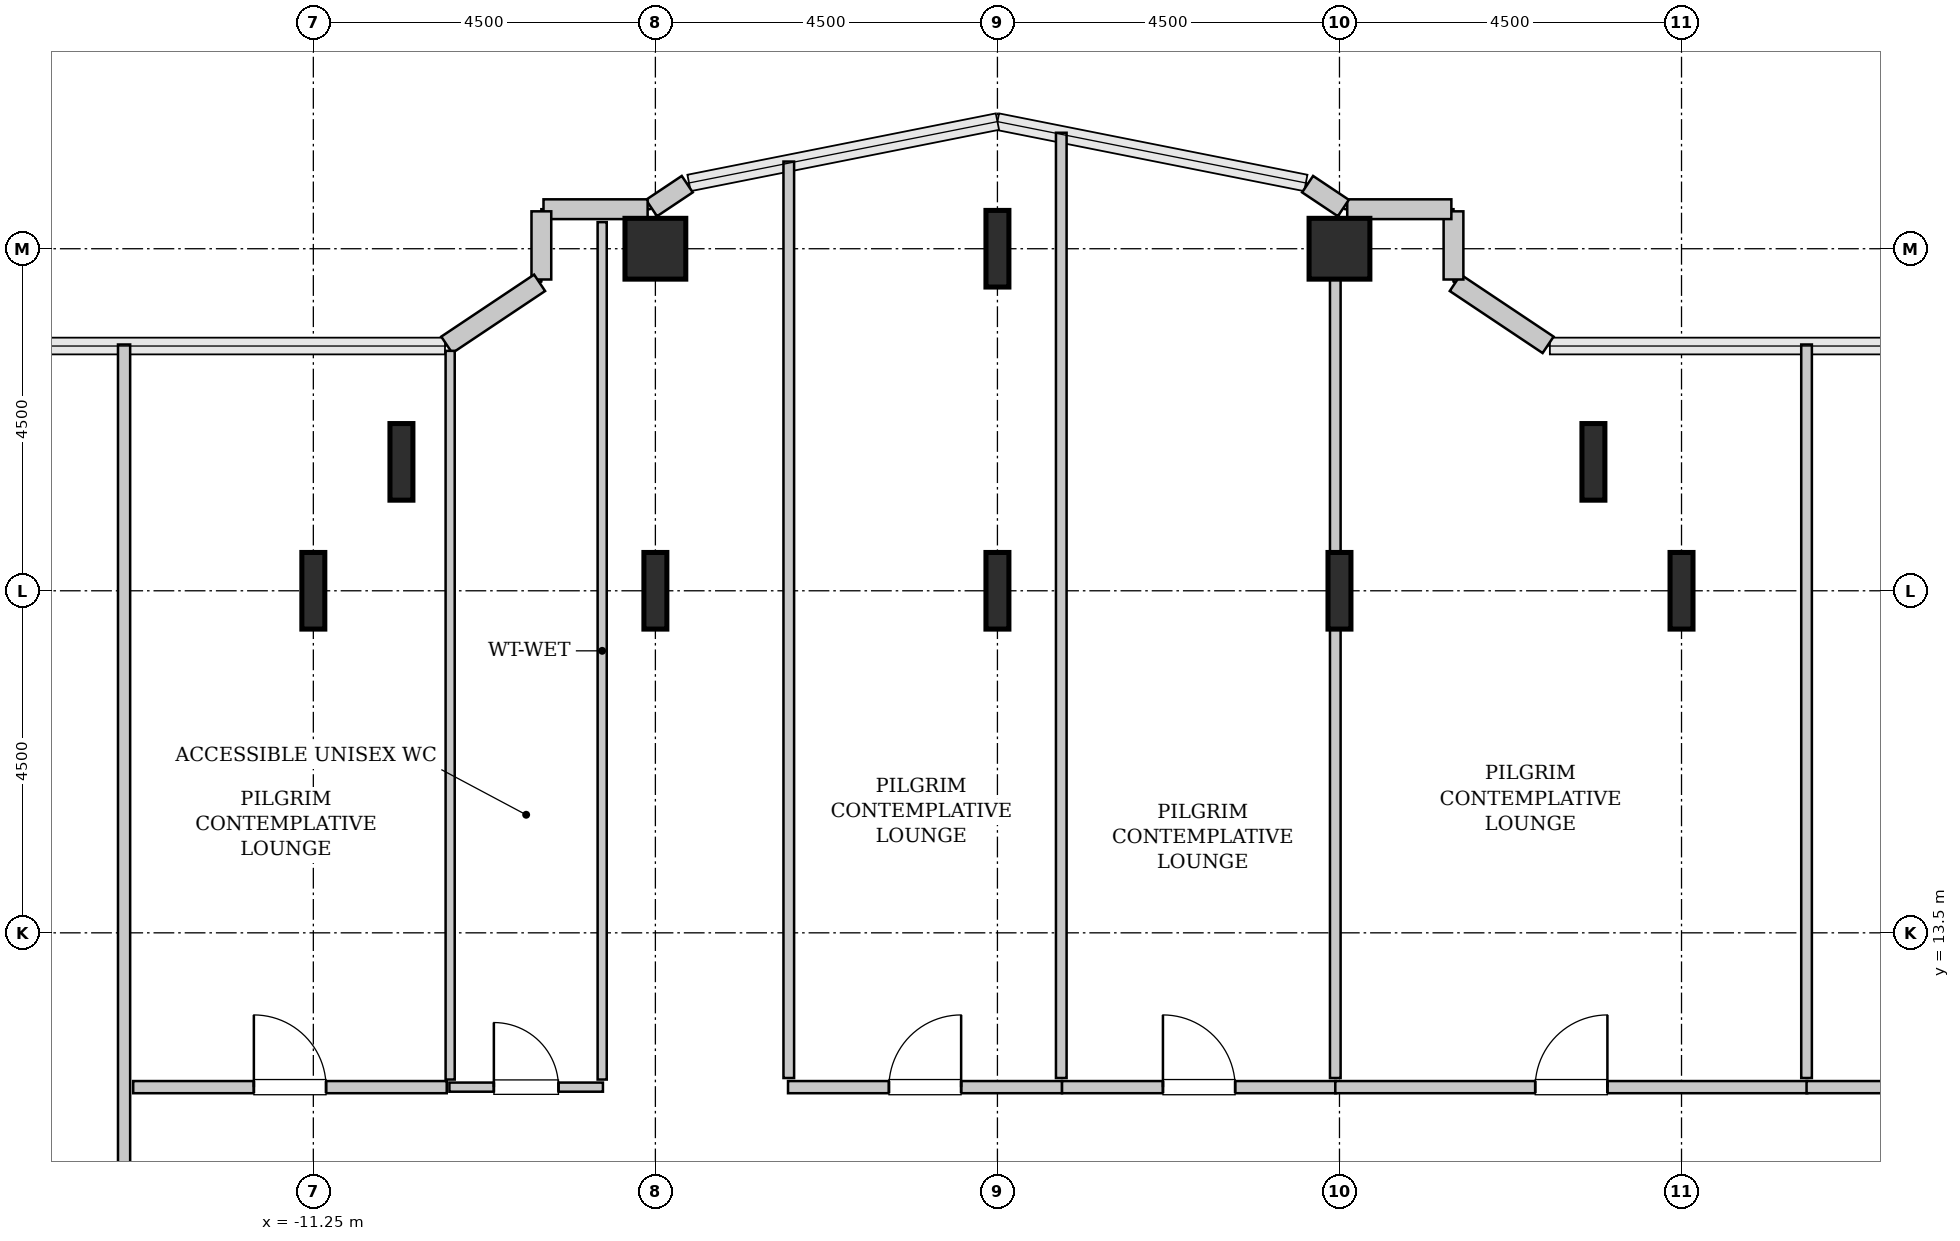
"""IFC4 building model, lengths in metres.
Left out: names, types, materials, properties, quantities, classifications, styles, units other than length and angle.
Written with IfcOpenShell. Run it as: python <this file> out.ifc"""

import sys

from ifc_helpers import new_model, si_unit, direction, frame, frame_2d, origin, origin_2d, place, context, subcontext, project, spatial, rectangle, hollow_rectangle, i_section, extrude, source, transform, mapped, element, fill, save


model = new_model("IFC4")
c1 = context("Model", 3, precision=1e-05, world=origin(), true_north=direction((0.0, 1.0)))
c2 = subcontext(c1, "Body", "Model", "MODEL_VIEW")
j1 = project(units=[si_unit("LENGTHUNIT", "METRE"), si_unit("PLANEANGLEUNIT", "RADIAN")], contexts=[c1])
p1 = place(None, origin())
s1 = spatial("IfcSite", under=j1, at=p1, CompositionType="ELEMENT")
p2 = place(p1, origin())
s2 = spatial("IfcBuilding", under=s1, at=p2, CompositionType="ELEMENT")
p3 = place(p2, frame((0.0, 0.0, 132.6)))
s3 = spatial("IfcBuildingStorey", under=s2, at=p3, CompositionType="ELEMENT", Elevation=132.6)
m1 = source(origin(), c2, "Body", "SweptSolid", [
    extrude(i_section(OverallWidth=0.302, OverallDepth=1.008, WebThickness=0.021, FlangeThickness=0.04, FilletRadius=0.03, at=origin_2d()), origin(), (0.0, 0.0, 1.0), 3.8),
])
for number, where, z_axis, x_axis in (
    (1, (-11.25, 18.0, 0.0), (0.0, 0.0, 1.0), (1.0, 0.0, 0.0)),
    (2, (-10.091, 19.696, 0.0), (0.0, 0.0, 1.0), (1.0, 0.0, 0.0)),
    (3, (-6.75, 18.0, 0.0), (0.0, 0.0, 1.0), (1.0, 0.0, 0.0)),
):
    element("IfcColumn", number, at=place(p3, frame(where, z_axis=z_axis, x_axis=x_axis)), inside=s3, PredefinedType="COLUMN", context=c2, shape_type="MappedRepresentation", body=[
        mapped(m1, transform((0.0, 0.0, 0.0), x_axis=(1.0, 0.0, 0.0), y_axis=(0.0, 1.0, 0.0), z_axis=(0.0, 0.0, 1.0), scale=1.0)),
    ])
m2 = source(origin(), c2, "Body", "SweptSolid", [
    extrude(hollow_rectangle(XDim=0.8, YDim=0.8, WallThickness=0.04, InnerFilletRadius=0.04, OuterFilletRadius=0.08, at=origin_2d()), origin(), (0.0, 0.0, 1.0), 3.8),
])
p4 = place(p3, frame((-6.75, 22.5, 0.0), z_axis=(0.0, 0.0, 1.0), x_axis=(1.0, 0.0, 0.0)))
e4 = element("IfcColumn", 4, at=p4, inside=s3, PredefinedType="COLUMN", context=c2, shape_type="MappedRepresentation", body=[
    mapped(m2, transform((0.0, 0.0, 0.0), x_axis=(1.0, 0.0, 0.0), y_axis=(0.0, 1.0, 0.0), z_axis=(0.0, 0.0, 1.0), scale=1.0)),
])
for number, where, z_axis, x_axis in (
    (5, (-2.25, 18.0, 0.0), (0.0, 0.0, 1.0), (1.0, 0.0, 0.0)),
    (6, (-2.25, 22.5, 0.0), (0.0, 0.0, 1.0), (1.0, 0.0, 0.0)),
    (7, (2.25, 18.0, 0.0), (0.0, 0.0, 1.0), (1.0, 0.0, 0.0)),
):
    element("IfcColumn", number, at=place(p3, frame(where, z_axis=z_axis, x_axis=x_axis)), inside=s3, PredefinedType="COLUMN", context=c2, shape_type="MappedRepresentation", body=[
        mapped(m1, transform((0.0, 0.0, 0.0), x_axis=(1.0, 0.0, 0.0), y_axis=(0.0, 1.0, 0.0), z_axis=(0.0, 0.0, 1.0), scale=1.0)),
    ])
p5 = place(p3, frame((2.25, 22.5, 0.0), z_axis=(0.0, 0.0, 1.0), x_axis=(1.0, 0.0, 0.0)))
e8 = element("IfcColumn", 8, at=p5, inside=s3, PredefinedType="COLUMN", context=c2, shape_type="MappedRepresentation", body=[
    mapped(m2, transform((0.0, 0.0, 0.0), x_axis=(1.0, 0.0, 0.0), y_axis=(0.0, 1.0, 0.0), z_axis=(0.0, 0.0, 1.0), scale=1.0)),
])
for number, where, z_axis, x_axis in (
    (9, (5.591, 19.696, 0.0), (0.0, 0.0, 1.0), (1.0, 0.0, 0.0)),
    (10, (6.75, 18.0, 0.0), (0.0, 0.0, 1.0), (1.0, 0.0, 0.0)),
):
    element("IfcColumn", number, at=place(p3, frame(where, z_axis=z_axis, x_axis=x_axis)), inside=s3, PredefinedType="COLUMN", context=c2, shape_type="MappedRepresentation", body=[
        mapped(m1, transform((0.0, 0.0, 0.0), x_axis=(1.0, 0.0, 0.0), y_axis=(0.0, 1.0, 0.0), z_axis=(0.0, 0.0, 1.0), scale=1.0)),
    ])
m3 = source(origin(), c2, "Body", "SweptSolid", [
    extrude(rectangle(XDim=1.469, YDim=0.26, at=frame_2d((0.734, 0.0))), origin(), (0.0, 0.0, 1.0), 3.55),
])
p6 = place(p3, frame((4.995, 21.236, 0.0), z_axis=(0.0, 0.0, 1.0), x_axis=(-0.831461760506, 0.555581983884, 0.0)))
e11 = element("IfcWall", 11, at=p6, inside=s3, PredefinedType="SOLIDWALL", context=c2, shape_type="MappedRepresentation", body=[
    mapped(m3, transform((0.0, 0.0, 0.0), x_axis=(1.0, 0.0, 0.0), y_axis=(0.0, 1.0, 0.0), z_axis=(0.0, 0.0, 1.0), scale=1.0)),
])
m4 = source(origin(), c2, "Body", "SweptSolid", [
    extrude(rectangle(XDim=0.897, YDim=0.26, at=frame_2d((0.448, 0.0))), origin(), (0.0, 0.0, 1.0), 3.55),
])
p7 = place(p3, frame((3.75, 22.095, 0.0), z_axis=(0.0, 0.0, 1.0), x_axis=(0.0, 1.0, 0.0)))
e12 = element("IfcWall", 12, at=p7, inside=s3, PredefinedType="SOLIDWALL", context=c2, shape_type="MappedRepresentation", body=[
    mapped(m4, transform((0.0, 0.0, 0.0), x_axis=(1.0, 0.0, 0.0), y_axis=(0.0, 1.0, 0.0), z_axis=(0.0, 0.0, 1.0), scale=1.0)),
])
m5 = source(origin(), c2, "Body", "SweptSolid", [
    extrude(rectangle(XDim=1.37, YDim=0.26, at=frame_2d((0.685, 0.0))), origin(), (0.0, 0.0, 1.0), 3.55),
])
p8 = place(p3, frame((3.722, 23.02, 0.0), z_axis=(0.0, 0.0, 1.0), x_axis=(-1.0, 0.0, 0.0)))
e13 = element("IfcWall", 13, at=p8, inside=s3, PredefinedType="SOLIDWALL", context=c2, shape_type="MappedRepresentation", body=[
    mapped(m5, transform((0.0, 0.0, 0.0), x_axis=(1.0, 0.0, 0.0), y_axis=(0.0, 1.0, 0.0), z_axis=(0.0, 0.0, 1.0), scale=1.0)),
])
m6 = source(origin(), c2, "Body", "SweptSolid", [
    extrude(rectangle(XDim=0.565, YDim=0.26, at=frame_2d((0.283, 0.0))), origin(), (0.0, 0.0, 1.0), 3.55),
])
for number, where, z_axis, x_axis in (
    (14, (2.301, 23.036, 0.0), (0.0, 0.0, 1.0), (-0.832, 0.555, 0.0)),
    (15, (-6.331, 23.35, 0.0), (0.0, 0.0, 1.0), (-0.832, -0.555, 0.0)),
):
    element("IfcWall", number, at=place(p3, frame(where, z_axis=z_axis, x_axis=x_axis)), inside=s3, PredefinedType="SOLIDWALL", context=c2, shape_type="MappedRepresentation", body=[
        mapped(m6, transform((0.0, 0.0, 0.0), x_axis=(1.0, 0.0, 0.0), y_axis=(0.0, 1.0, 0.0), z_axis=(0.0, 0.0, 1.0), scale=1.0)),
    ])
p9 = place(p3, frame((-6.852, 23.02, 0.0), z_axis=(0.0, 0.0, 1.0), x_axis=(-1.0, 0.0, 0.0)))
e16 = element("IfcWall", 16, at=p9, inside=s3, PredefinedType="SOLIDWALL", context=c2, shape_type="MappedRepresentation", body=[
    mapped(m5, transform((0.0, 0.0, 0.0), x_axis=(1.0, 0.0, 0.0), y_axis=(0.0, 1.0, 0.0), z_axis=(0.0, 0.0, 1.0), scale=1.0)),
])
p10 = place(p3, frame((-8.25, 22.992, 0.0), z_axis=(0.0, 0.0, 1.0), x_axis=(0.0, -1.0, 0.0)))
e17 = element("IfcWall", 17, at=p10, inside=s3, PredefinedType="SOLIDWALL", context=c2, shape_type="MappedRepresentation", body=[
    mapped(m4, transform((0.0, 0.0, 0.0), x_axis=(1.0, 0.0, 0.0), y_axis=(0.0, 1.0, 0.0), z_axis=(0.0, 0.0, 1.0), scale=1.0)),
])
p11 = place(p3, frame((-8.273, 22.052, 0.0), z_axis=(0.0, 0.0, 1.0), x_axis=(-0.831461760506, -0.555581983884, 0.0)))
e18 = element("IfcWall", 18, at=p11, inside=s3, PredefinedType="SOLIDWALL", context=c2, shape_type="MappedRepresentation", body=[
    mapped(m3, transform((0.0, 0.0, 0.0), x_axis=(1.0, 0.0, 0.0), y_axis=(0.0, 1.0, 0.0), z_axis=(0.0, 0.0, 1.0), scale=1.0)),
])
m7 = source(origin(), c2, "Body", "SweptSolid", [
    extrude(rectangle(XDim=2.02, YDim=0.12, at=frame_2d((1.01, 0.0))), origin(), (0.0, 0.0, 1.0), 3.535),
])
p12 = place(p3, frame((-9.46, 11.47, 0.0), z_axis=(0.0, 0.0, 1.0), x_axis=(1.0, 0.0, 0.0)))
e19 = element("IfcWall", 19, at=p12, inside=s3, PredefinedType="PLUMBINGWALL", context=c2, shape_type="MappedRepresentation", body=[
    mapped(m7, transform((0.0, 0.0, 0.0), x_axis=(1.0, 0.0, 0.0), y_axis=(0.0, 1.0, 0.0), z_axis=(0.0, 0.0, 1.0), scale=1.0)),
])
p13 = place(p12, frame((0.585, 0.0, 0.0)))
e20 = element("IfcOpeningElement", 20, at=p13, cuts=e19, PredefinedType="OPENING", context=c2, shape_type="SweptSolid", body=[
    extrude(rectangle(XDim=0.85, YDim=2.1, at=frame_2d((0.425, 1.05))), frame((0.0, 0.07, 0.0), z_axis=(0.0, -1.0, 0.0), x_axis=(1.0, 0.0, 0.0)), (0.0, 0.0, 1.0), 0.14),
])
m8 = source(origin(), c2, "Body", "SweptSolid", [
    extrude(rectangle(XDim=11.28, YDim=0.12, at=frame_2d((5.64, 0.0))), origin(), (0.0, 0.0, 1.0), 3.535),
])
p14 = place(p3, frame((-7.45, 11.57, 0.0), z_axis=(0.0, 0.0, 1.0), x_axis=(0.0, 1.0, 0.0)))
e21 = element("IfcWall", 21, at=p14, inside=s3, PredefinedType="PLUMBINGWALL", context=c2, shape_type="MappedRepresentation", body=[
    mapped(m8, transform((0.0, 0.0, 0.0), x_axis=(1.0, 0.0, 0.0), y_axis=(0.0, 1.0, 0.0), z_axis=(0.0, 0.0, 1.0), scale=1.0)),
])
m9 = source(origin(), c2, "Body", "SweptSolid", [
    extrude(rectangle(XDim=9.587, YDim=0.12, at=frame_2d((4.793, 0.0))), origin(), (0.0, 0.0, 1.0), 3.535),
])
p15 = place(p3, frame((-9.45, 11.57, 0.0), z_axis=(0.0, 0.0, 1.0), x_axis=(0.0, 1.0, 0.0)))
e22 = element("IfcWall", 22, at=p15, inside=s3, PredefinedType="PLUMBINGWALL", context=c2, shape_type="MappedRepresentation", body=[
    mapped(m9, transform((0.0, 0.0, 0.0), x_axis=(1.0, 0.0, 0.0), y_axis=(0.0, 1.0, 0.0), z_axis=(0.0, 0.0, 1.0), scale=1.0)),
])
m10 = source(origin(), c2, "Body", "SweptSolid", [
    extrude(rectangle(XDim=15.645, YDim=0.16, at=frame_2d((7.823, 0.0))), origin(), (0.0, 0.0, 1.0), 3.535),
])
p16 = place(p3, frame((-13.74, 5.595, 0.0), z_axis=(0.0, 0.0, 1.0), x_axis=(0.0, 1.0, 0.0)))
e23 = element("IfcWall", 23, at=p16, inside=s3, PredefinedType="PARTITIONING", context=c2, shape_type="MappedRepresentation", body=[
    mapped(m10, transform((0.0, 0.0, 0.0), x_axis=(1.0, 0.0, 0.0), y_axis=(0.0, 1.0, 0.0), z_axis=(0.0, 0.0, 1.0), scale=1.0)),
])
p17 = place(p16, frame((2.482, 0.0, 0.0)))
e24 = element("IfcOpeningElement", 24, at=p17, cuts=e23, PredefinedType="OPENING", context=c2, shape_type="SweptSolid", body=[
    extrude(rectangle(XDim=0.95, YDim=2.1, at=frame_2d((0.475, 1.05))), frame((0.0, 0.09, 0.0), z_axis=(0.0, -1.0, 0.0), x_axis=(1.0, 0.0, 0.0)), (0.0, 0.0, 1.0), 0.18),
])
m11 = source(origin(), c2, "Body", "SweptSolid", [
    extrude(rectangle(XDim=4.125, YDim=0.16, at=frame_2d((2.062, 0.0))), origin(), (0.0, 0.0, 1.0), 3.535),
])
p18 = place(p3, frame((-13.62, 11.47, 0.0), z_axis=(0.0, 0.0, 1.0), x_axis=(1.0, 0.0, 0.0)))
e25 = element("IfcWall", 25, at=p18, inside=s3, PredefinedType="PARTITIONING", context=c2, shape_type="MappedRepresentation", body=[
    mapped(m11, transform((0.0, 0.0, 0.0), x_axis=(1.0, 0.0, 0.0), y_axis=(0.0, 1.0, 0.0), z_axis=(0.0, 0.0, 1.0), scale=1.0)),
])
p19 = place(p18, frame((1.587, 0.0, 0.0)))
e26 = element("IfcOpeningElement", 26, at=p19, cuts=e25, PredefinedType="OPENING", context=c2, shape_type="SweptSolid", body=[
    extrude(rectangle(XDim=0.95, YDim=2.1, at=frame_2d((0.475, 1.05))), frame((0.0, 0.09, 0.0), z_axis=(0.0, -1.0, 0.0), x_axis=(1.0, 0.0, 0.0)), (0.0, 0.0, 1.0), 0.18),
])
m12 = source(origin(), c2, "Body", "SweptSolid", [
    extrude(rectangle(XDim=3.605, YDim=0.16, at=frame_2d((1.802, 0.0))), origin(), (0.0, 0.0, 1.0), 3.535),
])
p20 = place(p3, frame((-5.005, 11.47, 0.0), z_axis=(0.0, 0.0, 1.0), x_axis=(1.0, 0.0, 0.0)))
e27 = element("IfcWall", 27, at=p20, inside=s3, PredefinedType="PARTITIONING", context=c2, shape_type="MappedRepresentation", body=[
    mapped(m12, transform((0.0, 0.0, 0.0), x_axis=(1.0, 0.0, 0.0), y_axis=(0.0, 1.0, 0.0), z_axis=(0.0, 0.0, 1.0), scale=1.0)),
])
p21 = place(p20, frame((1.327, 0.0, 0.0)))
e28 = element("IfcOpeningElement", 28, at=p21, cuts=e27, PredefinedType="OPENING", context=c2, shape_type="SweptSolid", body=[
    extrude(rectangle(XDim=0.95, YDim=2.1, at=frame_2d((0.475, 1.05))), frame((0.0, 0.09, 0.0), z_axis=(0.0, -1.0, 0.0), x_axis=(1.0, 0.0, 0.0)), (0.0, 0.0, 1.0), 0.18),
])
m13 = source(origin(), c2, "Body", "SweptSolid", [
    extrude(rectangle(XDim=12.436, YDim=0.14, at=frame_2d((6.218, 0.0))), origin(), (0.0, 0.0, 1.0), 3.535),
])
p22 = place(p3, frame((-1.41, 11.59, 0.0), z_axis=(0.0, 0.0, 1.0), x_axis=(0.0, 1.0, 0.0)))
e29 = element("IfcWall", 29, at=p22, inside=s3, PredefinedType="PARTITIONING", context=c2, shape_type="MappedRepresentation", body=[
    mapped(m13, transform((0.0, 0.0, 0.0), x_axis=(1.0, 0.0, 0.0), y_axis=(0.0, 1.0, 0.0), z_axis=(0.0, 0.0, 1.0), scale=1.0)),
])
m14 = source(origin(), c2, "Body", "SweptSolid", [
    extrude(rectangle(XDim=12.057, YDim=0.14, at=frame_2d((6.028, 0.0))), origin(), (0.0, 0.0, 1.0), 3.535),
])
p23 = place(p3, frame((-4.995, 11.59, 0.0), z_axis=(0.0, 0.0, 1.0), x_axis=(0.0, 1.0, 0.0)))
e30 = element("IfcWall", 30, at=p23, inside=s3, PredefinedType="PARTITIONING", context=c2, shape_type="MappedRepresentation", body=[
    mapped(m14, transform((0.0, 0.0, 0.0), x_axis=(1.0, 0.0, 0.0), y_axis=(0.0, 1.0, 0.0), z_axis=(0.0, 0.0, 1.0), scale=1.0)),
])
p24 = place(p3, frame((-1.4, 11.47, 0.0), z_axis=(0.0, 0.0, 1.0), x_axis=(1.0, 0.0, 0.0)))
e31 = element("IfcWall", 31, at=p24, inside=s3, PredefinedType="PARTITIONING", context=c2, shape_type="MappedRepresentation", body=[
    mapped(m12, transform((0.0, 0.0, 0.0), x_axis=(1.0, 0.0, 0.0), y_axis=(0.0, 1.0, 0.0), z_axis=(0.0, 0.0, 1.0), scale=1.0)),
])
p25 = place(p24, frame((1.327, 0.0, 0.0)))
e32 = element("IfcOpeningElement", 32, at=p25, cuts=e31, PredefinedType="OPENING", context=c2, shape_type="SweptSolid", body=[
    extrude(rectangle(XDim=0.95, YDim=2.1, at=frame_2d((0.475, 1.05))), frame((0.0, 0.09, 0.0), z_axis=(0.0, -1.0, 0.0), x_axis=(1.0, 0.0, 0.0)), (0.0, 0.0, 1.0), 0.18),
])
m15 = source(origin(), c2, "Body", "SweptSolid", [
    extrude(rectangle(XDim=11.314, YDim=0.14, at=frame_2d((5.657, 0.0))), origin(), (0.0, 0.0, 1.0), 2.875),
])
p26 = place(p3, frame((2.195, 11.59, 0.0), z_axis=(0.0, 0.0, 1.0), x_axis=(0.0, 1.0, 0.0)))
e33 = element("IfcWall", 33, at=p26, inside=s3, PredefinedType="PARTITIONING", context=c2, shape_type="MappedRepresentation", body=[
    mapped(m15, transform((0.0, 0.0, 0.0), x_axis=(1.0, 0.0, 0.0), y_axis=(0.0, 1.0, 0.0), z_axis=(0.0, 0.0, 1.0), scale=1.0)),
])
m16 = source(origin(), c2, "Body", "SweptSolid", [
    extrude(rectangle(XDim=6.21, YDim=0.16, at=frame_2d((3.105, 0.0))), origin(), (0.0, 0.0, 1.0), 3.535),
])
p27 = place(p3, frame((2.195, 11.47, 0.0), z_axis=(0.0, 0.0, 1.0), x_axis=(1.0, 0.0, 0.0)))
e34 = element("IfcWall", 34, at=p27, inside=s3, PredefinedType="PARTITIONING", context=c2, shape_type="MappedRepresentation", body=[
    mapped(m16, transform((0.0, 0.0, 0.0), x_axis=(1.0, 0.0, 0.0), y_axis=(0.0, 1.0, 0.0), z_axis=(0.0, 0.0, 1.0), scale=1.0)),
])
p28 = place(p27, frame((2.63, 0.0, 0.0)))
e35 = element("IfcOpeningElement", 35, at=p28, cuts=e34, PredefinedType="OPENING", context=c2, shape_type="SweptSolid", body=[
    extrude(rectangle(XDim=0.95, YDim=2.1, at=frame_2d((0.475, 1.05))), frame((0.0, 0.09, 0.0), z_axis=(0.0, -1.0, 0.0), x_axis=(1.0, 0.0, 0.0)), (0.0, 0.0, 1.0), 0.18),
])
m17 = source(origin(), c2, "Body", "SweptSolid", [
    extrude(rectangle(XDim=9.65, YDim=0.14, at=frame_2d((4.825, 0.0))), origin(), (0.0, 0.0, 1.0), 3.535),
])
p29 = place(p3, frame((8.395, 11.59, 0.0), z_axis=(0.0, 0.0, 1.0), x_axis=(0.0, 1.0, 0.0)))
e36 = element("IfcWall", 36, at=p29, inside=s3, PredefinedType="PARTITIONING", context=c2, shape_type="MappedRepresentation", body=[
    mapped(m17, transform((0.0, 0.0, 0.0), x_axis=(1.0, 0.0, 0.0), y_axis=(0.0, 1.0, 0.0), z_axis=(0.0, 0.0, 1.0), scale=1.0)),
])
m18 = source(origin(), c2, "Body", "SweptSolid", [
    extrude(rectangle(XDim=5.225, YDim=0.16, at=frame_2d((2.613, 0.0))), origin(), (0.0, 0.0, 1.0), 3.535),
])
p30 = place(p3, frame((8.395, 11.47, 0.0), z_axis=(0.0, 0.0, 1.0), x_axis=(1.0, 0.0, 0.0)))
e37 = element("IfcWall", 37, at=p30, inside=s3, PredefinedType="PARTITIONING", context=c2, shape_type="MappedRepresentation", body=[
    mapped(m18, transform((0.0, 0.0, 0.0), x_axis=(1.0, 0.0, 0.0), y_axis=(0.0, 1.0, 0.0), z_axis=(0.0, 0.0, 1.0), scale=1.0)),
])
p31 = place(p30, frame((2.137, 0.0, 0.0)))
e38 = element("IfcOpeningElement", 38, at=p31, cuts=e37, PredefinedType="OPENING", context=c2, shape_type="SweptSolid", body=[
    extrude(rectangle(XDim=0.95, YDim=2.1, at=frame_2d((0.475, 1.05))), frame((0.0, 0.09, 0.0), z_axis=(0.0, -1.0, 0.0), x_axis=(1.0, 0.0, 0.0)), (0.0, 0.0, 1.0), 0.18),
])
m19 = source(origin(), c2, "Body", "SweptSolid", [
    extrude(rectangle(XDim=0.85, YDim=2.1, at=frame_2d((0.425, 1.05))), frame((0.0, 0.025, 0.0), z_axis=(0.0, -1.0, 0.0), x_axis=(1.0, 0.0, 0.0)), (0.0, 0.0, 1.0), 0.05),
])
p32 = place(p13, origin())
e39 = element("IfcDoor", 39, at=p32, inside=s3, OperationType="SINGLE_SWING_LEFT", PredefinedType="DOOR", context=c2, shape_type="MappedRepresentation", body=[
    mapped(m19, transform((0.0, 0.0, 0.0), x_axis=(1.0, 0.0, 0.0), y_axis=(0.0, 1.0, 0.0), z_axis=(0.0, 0.0, 1.0), scale=1.0)),
])
fill(e20, e39)
m20 = source(origin(), c2, "Body", "SweptSolid", [
    extrude(rectangle(XDim=0.95, YDim=2.1, at=frame_2d((0.475, 1.05))), frame((0.0, 0.025, 0.0), z_axis=(0.0, -1.0, 0.0), x_axis=(1.0, 0.0, 0.0)), (0.0, 0.0, 1.0), 0.05),
])
p33 = place(p19, origin())
e40 = element("IfcDoor", 40, at=p33, inside=s3, OperationType="SINGLE_SWING_LEFT", PredefinedType="DOOR", context=c2, shape_type="MappedRepresentation", body=[
    mapped(m20, transform((0.0, 0.0, 0.0), x_axis=(1.0, 0.0, 0.0), y_axis=(0.0, 1.0, 0.0), z_axis=(0.0, 0.0, 1.0), scale=1.0)),
])
fill(e26, e40)
p34 = place(p21, origin())
e41 = element("IfcDoor", 41, at=p34, inside=s3, OperationType="SINGLE_SWING_RIGHT", PredefinedType="DOOR", context=c2, shape_type="MappedRepresentation", body=[
    mapped(m20, transform((0.0, 0.0, 0.0), x_axis=(1.0, 0.0, 0.0), y_axis=(0.0, 1.0, 0.0), z_axis=(0.0, 0.0, 1.0), scale=1.0)),
])
fill(e28, e41)
p35 = place(p25, origin())
e42 = element("IfcDoor", 42, at=p35, inside=s3, OperationType="SINGLE_SWING_LEFT", PredefinedType="DOOR", context=c2, shape_type="MappedRepresentation", body=[
    mapped(m20, transform((0.0, 0.0, 0.0), x_axis=(1.0, 0.0, 0.0), y_axis=(0.0, 1.0, 0.0), z_axis=(0.0, 0.0, 1.0), scale=1.0)),
])
fill(e32, e42)
p36 = place(p28, origin())
e43 = element("IfcDoor", 43, at=p36, inside=s3, OperationType="SINGLE_SWING_RIGHT", PredefinedType="DOOR", context=c2, shape_type="MappedRepresentation", body=[
    mapped(m20, transform((0.0, 0.0, 0.0), x_axis=(1.0, 0.0, 0.0), y_axis=(0.0, 1.0, 0.0), z_axis=(0.0, 0.0, 1.0), scale=1.0)),
])
fill(e35, e43)
save(model, sys.argv[1])
